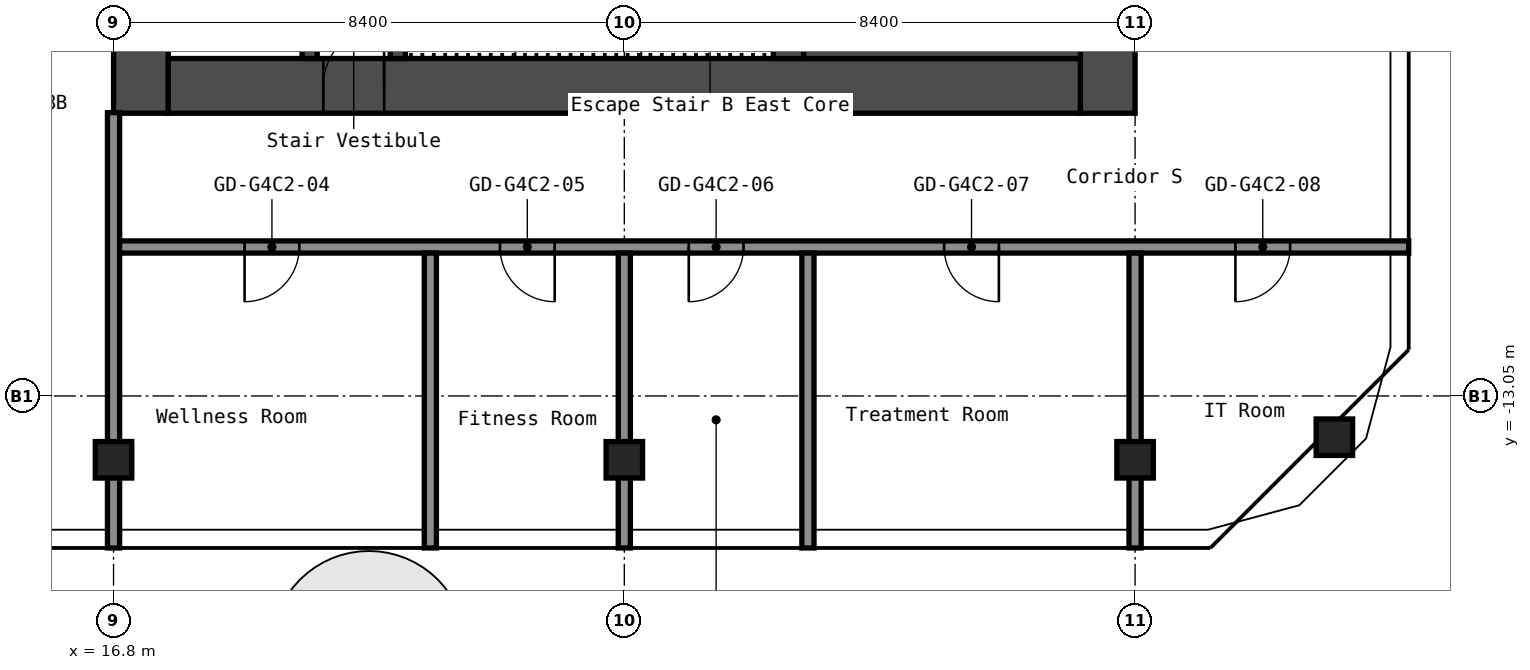
"""IFC4 building model, lengths in metres.
Left out: names, types, materials, properties, quantities, classifications, styles, units other than length and angle.
Written with IfcOpenShell. Run it as: python <this file> out.ifc"""

import sys

from ifc_helpers import new_model, si_unit, direction, frame, frame_2d, origin, origin_2d, place, context, subcontext, project, spatial, rectangle, hollow_rectangle, extrude, element, fill, save


model = new_model("IFC4")
c1 = context("Model", 3, precision=1e-05, world=origin(), true_north=direction((0.0, 1.0)))
c2 = subcontext(c1, "Body", "Model", "MODEL_VIEW")
j1 = project(units=[si_unit("LENGTHUNIT", "METRE"), si_unit("PLANEANGLEUNIT", "RADIAN")], contexts=[c1])
p1 = place(None, origin())
s1 = spatial("IfcSite", under=j1, at=p1, CompositionType="ELEMENT")
p2 = place(p1, origin())
s2 = spatial("IfcBuilding", under=s1, at=p2, CompositionType="ELEMENT")
p3 = place(p2, frame((0.0, 0.0, 225.0)))
s3 = spatial("IfcBuildingStorey", under=s2, at=p3, CompositionType="ELEMENT", Elevation=225.0)
for number, where, z_axis, x_axis in (
    (1, (16.8, -14.1, 0.0), (0.0, 0.0, 1.0), (1.0, 0.0, 0.0)),
    (2, (25.2, -14.1, 0.0), (0.0, 0.0, 1.0), (1.0, 0.0, 0.0)),
    (3, (33.6, -14.1, 0.0), (0.0, 0.0, 1.0), (1.0, 0.0, 0.0)),
    (4, (36.878, -13.729, 0.0), (0.0, 0.0, 1.0), (1.0, 0.0, 0.0)),
):
    element("IfcColumn", number, at=place(p3, frame(where, z_axis=z_axis, x_axis=x_axis)), inside=s3, PredefinedType="COLUMN", context=c2, shape_type="SweptSolid", body=[
        extrude(hollow_rectangle(XDim=0.6, YDim=0.6, WallThickness=0.025, InnerFilletRadius=0.038, OuterFilletRadius=0.062, at=origin_2d()), origin(), (0.0, 0.0, 1.0), 2.9),
    ])
p4 = place(p3, frame((17.25, -8.4, 0.0), z_axis=(0.0, 0.0, 1.0), x_axis=(0.0, 1.0, 0.0)))
e5 = element("IfcWall", 5, at=p4, inside=s3, PredefinedType="SHEAR", context=c2, shape_type="SweptSolid", body=[
    extrude(rectangle(XDim=16.8, YDim=0.9, at=frame_2d((8.4, 0.0))), origin(), (0.0, 0.0, 1.0), 2.9),
])
p5 = place(p4, frame((10.1, 0.0, 0.0)))
e6 = element("IfcOpeningElement", 6, at=p5, cuts=e5, PredefinedType="OPENING", context=c2, shape_type="SweptSolid", body=[
    extrude(rectangle(XDim=1.6, YDim=2.1, at=frame_2d((0.8, 1.05))), frame((0.0, 0.46, 0.0), z_axis=(0.0, -1.0, 0.0), x_axis=(1.0, 0.0, 0.0)), (0.0, 0.0, 1.0), 0.92),
])
p6 = place(p3, frame((33.15, -8.4, 0.0), z_axis=(0.0, 0.0, 1.0), x_axis=(0.0, 1.0, 0.0)))
e7 = element("IfcWall", 7, at=p6, inside=s3, PredefinedType="SHEAR", context=c2, shape_type="SweptSolid", body=[
    extrude(rectangle(XDim=16.8, YDim=0.9, at=frame_2d((8.4, 0.0))), origin(), (0.0, 0.0, 1.0), 2.9),
])
p7 = place(p3, frame((17.7, -7.95, 0.0), z_axis=(0.0, 0.0, 1.0), x_axis=(1.0, 0.0, 0.0)))
e8 = element("IfcWall", 8, at=p7, inside=s3, PredefinedType="SHEAR", context=c2, shape_type="SweptSolid", body=[
    extrude(rectangle(XDim=15.0, YDim=0.9, at=frame_2d((7.5, 0.0))), origin(), (0.0, 0.0, 1.0), 2.9),
])
p8 = place(p7, frame((2.55, 0.0, 0.0)))
e9 = element("IfcOpeningElement", 9, at=p8, cuts=e8, PredefinedType="OPENING", context=c2, shape_type="SweptSolid", body=[
    extrude(rectangle(XDim=1.0, YDim=2.1, at=frame_2d((0.5, 1.05))), frame((0.0, 0.46, 0.0), z_axis=(0.0, -1.0, 0.0), x_axis=(1.0, 0.0, 0.0)), (0.0, 0.0, 1.0), 0.92),
])
p9 = place(p3, frame((20.025, -7.5, 0.0), z_axis=(0.0, 0.0, 1.0), x_axis=(0.0, 1.0, 0.0)))
e10 = element("IfcWall", 10, at=p9, inside=s3, PredefinedType="SHEAR", context=c2, shape_type="SweptSolid", body=[
    extrude(rectangle(XDim=6.3, YDim=0.25, at=frame_2d((3.15, 0.0))), origin(), (0.0, 0.0, 1.0), 2.9),
])
p10 = place(p9, frame((2.4, 0.0, 0.0)))
e11 = element("IfcOpeningElement", 11, at=p10, cuts=e10, PredefinedType="OPENING", context=c2, shape_type="SweptSolid", body=[
    extrude(rectangle(XDim=1.0, YDim=2.1, at=frame_2d((0.5, 1.05))), frame((0.0, 0.135, 0.0), z_axis=(0.0, -1.0, 0.0), x_axis=(1.0, 0.0, 0.0)), (0.0, 0.0, 1.0), 0.27),
])
p11 = place(p3, frame((21.475, -7.5, 0.0), z_axis=(0.0, 0.0, 1.0), x_axis=(0.0, 1.0, 0.0)))
e12 = element("IfcWall", 12, at=p11, inside=s3, PredefinedType="SHEAR", context=c2, shape_type="SweptSolid", body=[
    extrude(rectangle(XDim=3.75, YDim=0.25, at=frame_2d((1.875, 0.0))), origin(), (0.0, 0.0, 1.0), 2.9),
])
p12 = place(p11, frame((1.3, 0.0, 0.0)))
e13 = element("IfcOpeningElement", 13, at=p12, cuts=e12, PredefinedType="OPENING", context=c2, shape_type="SweptSolid", body=[
    extrude(rectangle(XDim=1.2, YDim=2.1, at=frame_2d((0.6, 1.05))), frame((0.0, 0.135, 0.0), z_axis=(0.0, -1.0, 0.0), x_axis=(1.0, 0.0, 0.0)), (0.0, 0.0, 1.0), 0.27),
])
p13 = place(p3, frame((27.9, -7.5, 0.0), z_axis=(0.0, 0.0, 1.0), x_axis=(0.0, 1.0, 0.0)))
e14 = element("IfcWall", 14, at=p13, inside=s3, PredefinedType="SHEAR", context=c2, shape_type="SweptSolid", body=[
    extrude(rectangle(XDim=3.75, YDim=0.5, at=frame_2d((1.875, 0.0))), origin(), (0.0, 0.0, 1.0), 2.9),
])
p14 = place(p3, frame((28.15, -6.75, 0.0), z_axis=(0.0, 0.0, 1.0), x_axis=(1.0, 0.0, 0.0)))
e15 = element("IfcWall", 15, at=p14, inside=s3, PredefinedType="SHEAR", context=c2, shape_type="SweptSolid", body=[
    extrude(rectangle(XDim=4.55, YDim=1.5, at=frame_2d((2.275, 0.0))), origin(), (0.0, 0.0, 1.0), 2.9),
])
p15 = place(p3, frame((16.8, -10.6, 0.0), z_axis=(0.0, 0.0, 1.0), x_axis=(1.0, 0.0, 0.0)))
e16 = element("IfcWall", 16, at=p15, inside=s3, PredefinedType="PARTITIONING", context=c2, shape_type="SweptSolid", body=[
    extrude(rectangle(XDim=21.3, YDim=0.2, at=frame_2d((10.65, 0.0))), origin(), (0.0, 0.0, 1.0), 2.9),
])
p16 = place(p15, frame((2.155, 0.0, 0.0)))
e17 = element("IfcOpeningElement", 17, at=p16, cuts=e16, PredefinedType="OPENING", context=c2, shape_type="SweptSolid", body=[
    extrude(rectangle(XDim=0.9, YDim=2.1, at=frame_2d((0.45, 1.05))), frame((0.0, 0.11, 0.0), z_axis=(0.0, -1.0, 0.0), x_axis=(1.0, 0.0, 0.0)), (0.0, 0.0, 1.0), 0.22),
])
p17 = place(p15, frame((6.355, 0.0, 0.0)))
e18 = element("IfcOpeningElement", 18, at=p17, cuts=e16, PredefinedType="OPENING", context=c2, shape_type="SweptSolid", body=[
    extrude(rectangle(XDim=0.9, YDim=2.1, at=frame_2d((0.45, 1.05))), frame((0.0, 0.11, 0.0), z_axis=(0.0, -1.0, 0.0), x_axis=(1.0, 0.0, 0.0)), (0.0, 0.0, 1.0), 0.22),
])
p18 = place(p15, frame((9.46, 0.0, 0.0)))
e19 = element("IfcOpeningElement", 19, at=p18, cuts=e16, PredefinedType="OPENING", context=c2, shape_type="SweptSolid", body=[
    extrude(rectangle(XDim=0.9, YDim=2.1, at=frame_2d((0.45, 1.05))), frame((0.0, 0.11, 0.0), z_axis=(0.0, -1.0, 0.0), x_axis=(1.0, 0.0, 0.0)), (0.0, 0.0, 1.0), 0.22),
])
p19 = place(p15, frame((13.66, 0.0, 0.0)))
e20 = element("IfcOpeningElement", 20, at=p19, cuts=e16, PredefinedType="OPENING", context=c2, shape_type="SweptSolid", body=[
    extrude(rectangle(XDim=0.9, YDim=2.1, at=frame_2d((0.45, 1.05))), frame((0.0, 0.11, 0.0), z_axis=(0.0, -1.0, 0.0), x_axis=(1.0, 0.0, 0.0)), (0.0, 0.0, 1.0), 0.22),
])
p20 = place(p15, frame((18.45, 0.0, 0.0)))
e21 = element("IfcOpeningElement", 21, at=p20, cuts=e16, PredefinedType="OPENING", context=c2, shape_type="SweptSolid", body=[
    extrude(rectangle(XDim=0.9, YDim=2.1, at=frame_2d((0.45, 1.05))), frame((0.0, 0.11, 0.0), z_axis=(0.0, -1.0, 0.0), x_axis=(1.0, 0.0, 0.0)), (0.0, 0.0, 1.0), 0.22),
])
p21 = place(p3, frame((16.8, -15.55, 0.0), z_axis=(0.0, 0.0, 1.0), x_axis=(0.0, 1.0, 0.0)))
e22 = element("IfcWall", 22, at=p21, inside=s3, PredefinedType="PARTITIONING", context=c2, shape_type="SweptSolid", body=[
    extrude(rectangle(XDim=7.16, YDim=0.2, at=frame_2d((3.58, 0.0))), origin(), (0.0, 0.0, 1.0), 2.9),
])
for number, where, z_axis, x_axis in (
    (23, (22.01, -15.55, 0.0), (0.0, 0.0, 1.0), (0.0, 1.0, 0.0)),
    (24, (25.2, -15.55, 0.0), (0.0, 0.0, 1.0), (0.0, 1.0, 0.0)),
    (25, (28.22, -15.55, 0.0), (0.0, 0.0, 1.0), (0.0, 1.0, 0.0)),
    (26, (33.6, -15.55, 0.0), (0.0, 0.0, 1.0), (0.0, 1.0, 0.0)),
):
    element("IfcWall", number, at=place(p3, frame(where, z_axis=z_axis, x_axis=x_axis)), inside=s3, PredefinedType="PARTITIONING", context=c2, shape_type="SweptSolid", body=[
        extrude(rectangle(XDim=4.85, YDim=0.2, at=frame_2d((2.425, 0.0))), origin(), (0.0, 0.0, 1.0), 2.9),
    ])
p22 = place(p8, origin())
e27 = element("IfcDoor", 27, at=p22, inside=s3, OperationType="SINGLE_SWING_LEFT", PredefinedType="DOOR", context=c2, shape_type="SweptSolid", body=[
    extrude(rectangle(XDim=1.0, YDim=2.1, at=frame_2d((0.5, 1.05))), frame((0.0, 0.025, 0.0), z_axis=(0.0, -1.0, 0.0), x_axis=(1.0, 0.0, 0.0)), (0.0, 0.0, 1.0), 0.05),
])
fill(e9, e27)
p23 = place(p16, origin())
e28 = element("IfcDoor", 28, at=p23, inside=s3, OperationType="SINGLE_SWING_LEFT", PredefinedType="DOOR", context=c2, shape_type="SweptSolid", body=[
    extrude(rectangle(XDim=0.9, YDim=2.1, at=frame_2d((0.45, 1.05))), frame((0.0, 0.025, 0.0), z_axis=(0.0, -1.0, 0.0), x_axis=(1.0, 0.0, 0.0)), (0.0, 0.0, 1.0), 0.05),
])
fill(e17, e28)
p24 = place(p17, origin())
e29 = element("IfcDoor", 29, at=p24, inside=s3, OperationType="SINGLE_SWING_RIGHT", PredefinedType="DOOR", context=c2, shape_type="SweptSolid", body=[
    extrude(rectangle(XDim=0.9, YDim=2.1, at=frame_2d((0.45, 1.05))), frame((0.0, 0.025, 0.0), z_axis=(0.0, -1.0, 0.0), x_axis=(1.0, 0.0, 0.0)), (0.0, 0.0, 1.0), 0.05),
])
fill(e18, e29)
p25 = place(p18, origin())
e30 = element("IfcDoor", 30, at=p25, inside=s3, OperationType="SINGLE_SWING_LEFT", PredefinedType="DOOR", context=c2, shape_type="SweptSolid", body=[
    extrude(rectangle(XDim=0.9, YDim=2.1, at=frame_2d((0.45, 1.05))), frame((0.0, 0.025, 0.0), z_axis=(0.0, -1.0, 0.0), x_axis=(1.0, 0.0, 0.0)), (0.0, 0.0, 1.0), 0.05),
])
fill(e19, e30)
p26 = place(p19, origin())
e31 = element("IfcDoor", 31, at=p26, inside=s3, OperationType="SINGLE_SWING_RIGHT", PredefinedType="DOOR", context=c2, shape_type="SweptSolid", body=[
    extrude(rectangle(XDim=0.9, YDim=2.1, at=frame_2d((0.45, 1.05))), frame((0.0, 0.025, 0.0), z_axis=(0.0, -1.0, 0.0), x_axis=(1.0, 0.0, 0.0)), (0.0, 0.0, 1.0), 0.05),
])
fill(e20, e31)
p27 = place(p20, origin())
e32 = element("IfcDoor", 32, at=p27, inside=s3, OperationType="SINGLE_SWING_LEFT", PredefinedType="DOOR", context=c2, shape_type="SweptSolid", body=[
    extrude(rectangle(XDim=0.9, YDim=2.1, at=frame_2d((0.45, 1.05))), frame((0.0, 0.025, 0.0), z_axis=(0.0, -1.0, 0.0), x_axis=(1.0, 0.0, 0.0)), (0.0, 0.0, 1.0), 0.05),
])
fill(e21, e32)
save(model, sys.argv[1])
